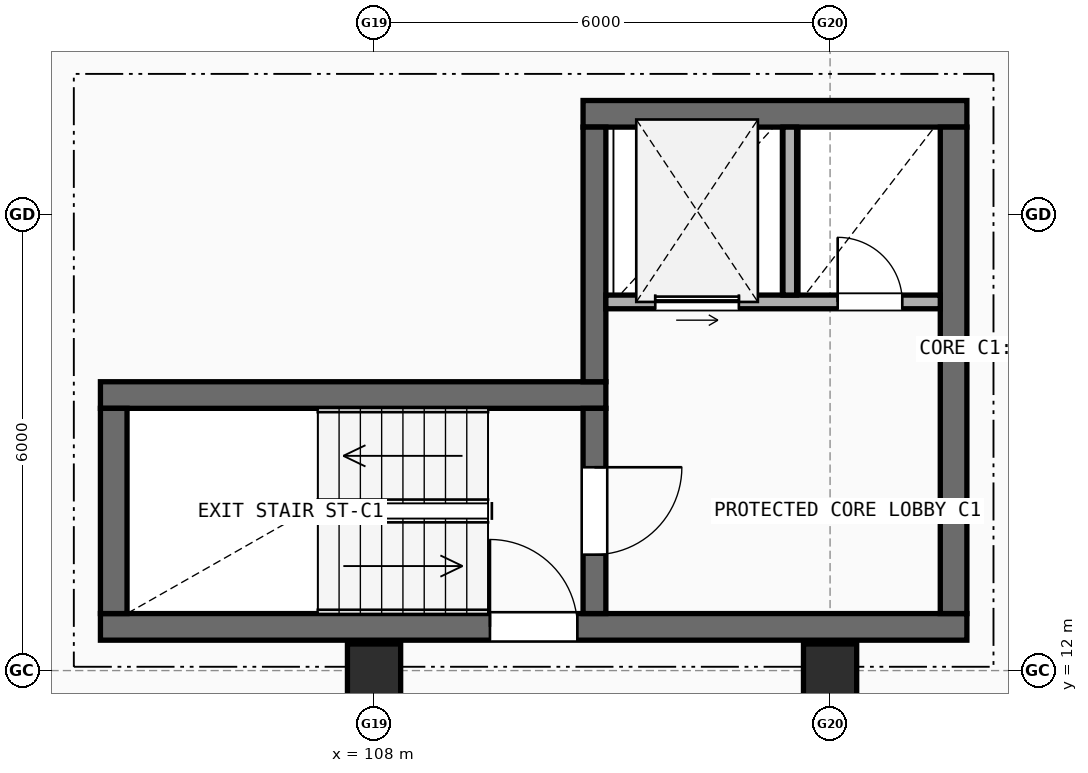
"""IFC4 building model, lengths in metres.
Left out: names, types, materials, properties, quantities, classifications, styles, units other than length and angle.
Written with IfcOpenShell. Run it as: python <this file> out.ifc"""

import sys

from ifc_helpers import new_model, si_unit, direction, frame, frame_2d, origin, origin_2d, place, context, subcontext, project, spatial, rectangle, extrude, element, fill, save


model = new_model("IFC4")
c1 = context("Model", 3, precision=1e-05, world=origin(), true_north=direction((0.0, 1.0)))
c2 = subcontext(c1, "Body", "Model", "MODEL_VIEW")
j1 = project(units=[si_unit("LENGTHUNIT", "METRE"), si_unit("PLANEANGLEUNIT", "RADIAN")], contexts=[c1])
p1 = place(None, origin())
s1 = spatial("IfcSite", under=j1, at=p1, CompositionType="ELEMENT")
p2 = place(p1, origin())
s2 = spatial("IfcBuilding", under=s1, at=p2, CompositionType="ELEMENT")
p3 = place(p2, frame((0.0, 0.0, 4.5)))
s3 = spatial("IfcBuildingStorey", under=s2, at=p3, CompositionType="ELEMENT", Elevation=4.5)
for number, where, z_axis, x_axis in (
    (1, (108.0, 12.0, 0.0), (0.0, 0.0, 1.0), (1.0, 0.0, 0.0)),
    (2, (114.0, 12.0, 0.0), (0.0, 0.0, 1.0), (1.0, 0.0, 0.0)),
):
    element("IfcColumn", number, at=place(p3, frame(where, z_axis=z_axis, x_axis=x_axis)), inside=s3, PredefinedType="COLUMN", context=c2, shape_type="SweptSolid", body=[
        extrude(rectangle(XDim=0.7, YDim=0.7, at=origin_2d()), origin(), (0.0, 0.0, 1.0), 2.945),
    ])
p4 = place(p3, frame((104.4, 12.575, 0.0), z_axis=(0.0, 0.0, 1.0), x_axis=(1.0, 0.0, 0.0)))
e3 = element("IfcWall", 3, at=p4, inside=s3, PredefinedType="SHEAR", context=c2, shape_type="SweptSolid", body=[
    extrude(rectangle(XDim=11.4, YDim=0.35, at=frame_2d((5.7, 0.0))), origin(), (0.0, 0.0, 1.0), 2.945),
])
p5 = place(p4, frame((5.125, 0.0, 0.0)))
e4 = element("IfcOpeningElement", 4, at=p5, cuts=e3, PredefinedType="OPENING", context=c2, shape_type="SweptSolid", body=[
    extrude(rectangle(XDim=1.15, YDim=2.15, at=frame_2d((0.575, 1.075))), frame((0.0, 0.185, 0.0), z_axis=(0.0, -1.0, 0.0), x_axis=(1.0, 0.0, 0.0)), (0.0, 0.0, 1.0), 0.37),
])
p6 = place(p3, frame((111.05, 15.625, 0.0), z_axis=(0.0, 0.0, 1.0), x_axis=(-1.0, 0.0, 0.0)))
e5 = element("IfcWall", 5, at=p6, inside=s3, PredefinedType="SHEAR", context=c2, shape_type="SweptSolid", body=[
    extrude(rectangle(XDim=6.65, YDim=0.35, at=frame_2d((3.325, 0.0))), origin(), (0.0, 0.0, 1.0), 2.945),
])
p7 = place(p3, frame((104.575, 15.45, 0.0), z_axis=(0.0, 0.0, 1.0), x_axis=(0.0, -1.0, 0.0)))
e6 = element("IfcWall", 6, at=p7, inside=s3, PredefinedType="SHEAR", context=c2, shape_type="SweptSolid", body=[
    extrude(rectangle(XDim=2.7, YDim=0.35, at=frame_2d((1.35, 0.0))), origin(), (0.0, 0.0, 1.0), 2.945),
])
p8 = place(p3, frame((110.9, 12.75, 0.0), z_axis=(0.0, 0.0, 1.0), x_axis=(0.0, 1.0, 0.0)))
e7 = element("IfcWall", 7, at=p8, inside=s3, PredefinedType="SHEAR", context=c2, shape_type="SweptSolid", body=[
    extrude(rectangle(XDim=2.7, YDim=0.3, at=frame_2d((1.35, 0.0))), origin(), (0.0, 0.0, 1.0), 2.945),
])
p9 = place(p8, frame((0.775, 0.0, 0.0)))
e8 = element("IfcOpeningElement", 8, at=p9, cuts=e7, PredefinedType="OPENING", context=c2, shape_type="SweptSolid", body=[
    extrude(rectangle(XDim=1.15, YDim=2.15, at=frame_2d((0.575, 1.075))), frame((0.0, 0.16, 0.0), z_axis=(0.0, -1.0, 0.0), x_axis=(1.0, 0.0, 0.0)), (0.0, 0.0, 1.0), 0.32),
])
p10 = place(p3, frame((115.8, 19.325, 0.0), z_axis=(0.0, 0.0, 1.0), x_axis=(-1.0, 0.0, 0.0)))
e9 = element("IfcWall", 9, at=p10, inside=s3, PredefinedType="SHEAR", context=c2, shape_type="SweptSolid", body=[
    extrude(rectangle(XDim=5.05, YDim=0.35, at=frame_2d((2.525, 0.0))), origin(), (0.0, 0.0, 1.0), 2.945),
])
p11 = place(p3, frame((115.625, 12.75, 0.0), z_axis=(0.0, 0.0, 1.0), x_axis=(0.0, 1.0, 0.0)))
e10 = element("IfcWall", 10, at=p11, inside=s3, PredefinedType="SHEAR", context=c2, shape_type="SweptSolid", body=[
    extrude(rectangle(XDim=6.4, YDim=0.35, at=frame_2d((3.2, 0.0))), origin(), (0.0, 0.0, 1.0), 2.945),
])
p12 = place(p3, frame((110.9, 15.8, 0.0), z_axis=(0.0, 0.0, 1.0), x_axis=(0.0, 1.0, 0.0)))
e11 = element("IfcWall", 11, at=p12, inside=s3, PredefinedType="SHEAR", context=c2, shape_type="SweptSolid", body=[
    extrude(rectangle(XDim=3.35, YDim=0.3, at=frame_2d((1.675, 0.0))), origin(), (0.0, 0.0, 1.0), 2.945),
])
p13 = place(p3, frame((111.05, 16.85, 0.0), z_axis=(0.0, 0.0, 1.0), x_axis=(1.0, 0.0, 0.0)))
e12 = element("IfcWall", 12, at=p13, inside=s3, PredefinedType="SOLIDWALL", context=c2, shape_type="SweptSolid", body=[
    extrude(rectangle(XDim=4.4, YDim=0.18, at=frame_2d((2.2, 0.0))), origin(), (0.0, 0.0, 1.0), 2.945),
])
p14 = place(p13, frame((0.65, 0.0, 0.0)))
e13 = element("IfcOpeningElement", 13, at=p14, cuts=e12, PredefinedType="OPENING", context=c2, shape_type="SweptSolid", body=[
    extrude(rectangle(XDim=1.1, YDim=2.15, at=frame_2d((0.55, 1.075))), frame((0.0, 0.1, 0.0), z_axis=(0.0, -1.0, 0.0), x_axis=(1.0, 0.0, 0.0)), (0.0, 0.0, 1.0), 0.2),
])
p15 = place(p13, frame((3.05, 0.0, 0.0)))
e14 = element("IfcOpeningElement", 14, at=p15, cuts=e12, PredefinedType="OPENING", context=c2, shape_type="SweptSolid", body=[
    extrude(rectangle(XDim=0.85, YDim=2.1, at=frame_2d((0.425, 1.05))), frame((0.0, 0.1, 0.0), z_axis=(0.0, -1.0, 0.0), x_axis=(1.0, 0.0, 0.0)), (0.0, 0.0, 1.0), 0.2),
])
p16 = place(p3, frame((113.47, 16.94, 0.0), z_axis=(0.0, 0.0, 1.0), x_axis=(0.0, 1.0, 0.0)))
e15 = element("IfcWall", 15, at=p16, inside=s3, PredefinedType="SOLIDWALL", context=c2, shape_type="SweptSolid", body=[
    extrude(rectangle(XDim=2.21, YDim=0.18, at=frame_2d((1.105, 0.0))), origin(), (0.0, 0.0, 1.0), 2.945),
])
p17 = place(p5, origin())
e16 = element("IfcDoor", 16, at=p17, inside=s3, OperationType="SINGLE_SWING_LEFT", PredefinedType="DOOR", context=c2, shape_type="SweptSolid", body=[
    extrude(rectangle(XDim=1.15, YDim=2.15, at=frame_2d((0.575, 1.075))), frame((0.0, 0.025, 0.0), z_axis=(0.0, -1.0, 0.0), x_axis=(1.0, 0.0, 0.0)), (0.0, 0.0, 1.0), 0.05),
])
fill(e4, e16)
p18 = place(p9, origin())
e17 = element("IfcDoor", 17, at=p18, inside=s3, OperationType="SINGLE_SWING_RIGHT", PredefinedType="DOOR", context=c2, shape_type="SweptSolid", body=[
    extrude(rectangle(XDim=1.15, YDim=2.15, at=frame_2d((0.575, 1.075))), frame((0.0, 0.025, 0.0), z_axis=(0.0, -1.0, 0.0), x_axis=(1.0, 0.0, 0.0)), (0.0, 0.0, 1.0), 0.05),
])
fill(e8, e17)
p19 = place(p14, origin())
e18 = element("IfcDoor", 18, at=p19, inside=s3, OperationType="SLIDING_TO_LEFT", PredefinedType="DOOR", context=c2, shape_type="SweptSolid", body=[
    extrude(rectangle(XDim=1.1, YDim=2.15, at=frame_2d((0.55, 1.075))), frame((0.0, 0.025, 0.0), z_axis=(0.0, -1.0, 0.0), x_axis=(1.0, 0.0, 0.0)), (0.0, 0.0, 1.0), 0.05),
])
fill(e13, e18)
p20 = place(p15, frame((0.85, 0.0, 0.0), z_axis=(0.0, 0.0, 1.0), x_axis=(-1.0, 0.0, 0.0)))
e19 = element("IfcDoor", 19, at=p20, inside=s3, OperationType="SINGLE_SWING_LEFT", PredefinedType="DOOR", context=c2, shape_type="SweptSolid", body=[
    extrude(rectangle(XDim=0.85, YDim=2.1, at=frame_2d((0.425, 1.05))), frame((0.0, 0.025, 0.0), z_axis=(0.0, -1.0, 0.0), x_axis=(1.0, 0.0, 0.0)), (0.0, 0.0, 1.0), 0.05),
])
fill(e14, e19)
save(model, sys.argv[1])
